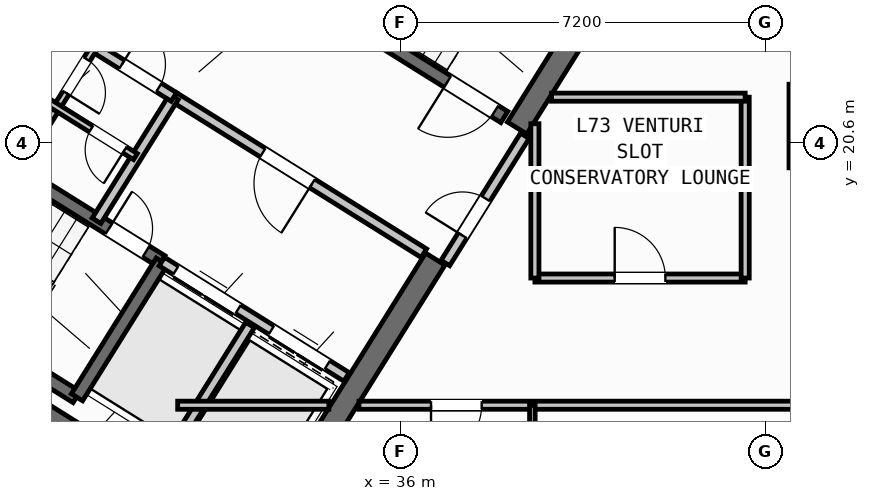
"""IFC4 building model, lengths in metres.
Left out: names, types, materials, properties, quantities, classifications, styles, units other than length and angle.
Written with IfcOpenShell. Run it as: python <this file> out.ifc"""

import sys

from ifc_helpers import new_model, si_unit, direction, frame, frame_2d, origin, place, context, subcontext, project, spatial, rectangle, extrude, source, transform, mapped, element, fill, save


model = new_model("IFC4")
c1 = context("Model", 3, precision=1e-05, world=origin(), true_north=direction((0.0, 1.0)))
c2 = subcontext(c1, "Body", "Model", "MODEL_VIEW")
j1 = project(units=[si_unit("LENGTHUNIT", "METRE"), si_unit("PLANEANGLEUNIT", "RADIAN")], contexts=[c1])
p1 = place(None, origin())
s1 = spatial("IfcSite", under=j1, at=p1, CompositionType="ELEMENT")
p2 = place(p1, origin())
s2 = spatial("IfcBuilding", under=s1, at=p2, CompositionType="ELEMENT")
p3 = place(p2, frame((0.0, 0.0, 288.0)))
s3 = spatial("IfcBuildingStorey", under=s2, at=p3, CompositionType="ELEMENT", Elevation=288.0)
p4 = place(p3, frame((33.324, 12.503, 0.0), z_axis=(0.0, 0.0, 1.0), x_axis=(-0.848043529849, 0.529926571782, 0.0)))
e1 = element("IfcWall", 1, at=p4, inside=s3, PredefinedType="SHEAR", context=c2, shape_type="SweptSolid", body=[
    extrude(rectangle(XDim=13.04, YDim=0.45, at=frame_2d((6.52, 0.0))), origin(), (0.0, 0.0, 1.0), 3.35),
])
p5 = place(p3, frame((40.221, 23.965, 0.0), z_axis=(0.0, 0.0, 1.0), x_axis=(-0.529902075036, -0.848058836916, 0.0)))
e2 = element("IfcWall", 2, at=p5, inside=s3, PredefinedType="SHEAR", context=c2, shape_type="SweptSolid", body=[
    extrude(rectangle(XDim=3.625, YDim=0.45, at=frame_2d((1.812, 0.0))), origin(), (0.0, 0.0, 1.0), 3.35),
])
p6 = place(p3, frame((36.683, 18.304, 0.0), z_axis=(0.0, 0.0, 1.0), x_axis=(-0.529904039071, -0.848057609704, 0.0)))
e3 = element("IfcWall", 3, at=p6, inside=s3, PredefinedType="SHEAR", context=c2, shape_type="SweptSolid", body=[
    extrude(rectangle(XDim=6.475, YDim=0.45, at=frame_2d((3.238, 0.0))), origin(), (0.0, 0.0, 1.0), 3.35),
])
p7 = place(p3, frame((29.268, 6.429, 0.0), z_axis=(0.0, 0.0, 1.0), x_axis=(-0.848048398186, 0.529918780885, 0.0)))
e4 = element("IfcWall", 4, at=p7, inside=s3, PredefinedType="STANDARD", context=c2, shape_type="SweptSolid", body=[
    extrude(rectangle(XDim=25.188, YDim=0.32, at=frame_2d((12.594, 0.0))), origin(), (0.0, 0.0, 1.0), 3.35),
])
p8 = place(p7, frame((16.362, 0.0, 0.0)))
e5 = element("IfcOpeningElement", 5, at=p8, cuts=e4, PredefinedType="OPENING", context=c2, shape_type="SweptSolid", body=[
    extrude(rectangle(XDim=1.2, YDim=2.15, at=frame_2d((0.6, 1.075))), frame((0.0, 0.17, 0.0), z_axis=(0.0, -1.0, 0.0), x_axis=(1.0, 0.0, 0.0)), (0.0, 0.0, 1.0), 0.34),
])
p9 = place(p7, frame((3.859, 0.0, 0.9)))
e6 = element("IfcOpeningElement", 6, at=p9, cuts=e4, PredefinedType="OPENING", context=c2, shape_type="SweptSolid", body=[
    extrude(rectangle(XDim=1.65, YDim=1.45, at=frame_2d((0.825, 0.725))), frame((0.0, 0.17, 0.0), z_axis=(0.0, -1.0, 0.0), x_axis=(1.0, 0.0, 0.0)), (0.0, 0.0, 1.0), 0.34),
])
p10 = place(p7, frame((10.519, 0.0, 0.9)))
e7 = element("IfcOpeningElement", 7, at=p10, cuts=e4, PredefinedType="OPENING", context=c2, shape_type="SweptSolid", body=[
    extrude(rectangle(XDim=1.65, YDim=1.45, at=frame_2d((0.825, 0.725))), frame((0.0, 0.17, 0.0), z_axis=(0.0, -1.0, 0.0), x_axis=(1.0, 0.0, 0.0)), (0.0, 0.0, 1.0), 0.34),
])
p11 = place(p7, frame((19.841, 0.0, 0.95)))
e8 = element("IfcOpeningElement", 8, at=p11, cuts=e4, PredefinedType="OPENING", context=c2, shape_type="SweptSolid", body=[
    extrude(rectangle(XDim=1.95, YDim=1.35, at=frame_2d((0.975, 0.675))), frame((0.0, 0.17, 0.0), z_axis=(0.0, -1.0, 0.0), x_axis=(1.0, 0.0, 0.0)), (0.0, 0.0, 1.0), 0.34),
])
p12 = place(p7, frame((23.478, 0.0, 1.0)))
e9 = element("IfcOpeningElement", 9, at=p12, cuts=e4, PredefinedType="OPENING", context=c2, shape_type="SweptSolid", body=[
    extrude(rectangle(XDim=0.9, YDim=1.25, at=frame_2d((0.45, 0.625))), frame((0.0, 0.17, 0.0), z_axis=(0.0, -1.0, 0.0), x_axis=(1.0, 0.0, 0.0)), (0.0, 0.0, 1.0), 0.34),
])
p13 = place(p3, frame((29.605, 15.581, 0.0), z_axis=(0.0, 0.0, 1.0), x_axis=(-0.848036911448, 0.529937163087, 0.0)))
e10 = element("IfcWall", 10, at=p13, inside=s3, PredefinedType="SHEAR", context=c2, shape_type="SweptSolid", body=[
    extrude(rectangle(XDim=7.46, YDim=0.26, at=frame_2d((3.73, 0.0))), origin(), (0.0, 0.0, 1.0), 3.35),
])
p14 = place(p3, frame((31.28, 18.261, 0.0), z_axis=(0.0, 0.0, 1.0), x_axis=(-0.848051618787, 0.529913626805, 0.0)))
e11 = element("IfcWall", 11, at=p14, inside=s3, PredefinedType="SHEAR", context=c2, shape_type="SweptSolid", body=[
    extrude(rectangle(XDim=7.46, YDim=0.26, at=frame_2d((3.73, 0.0))), origin(), (0.0, 0.0, 1.0), 3.35),
])
p15 = place(p14, frame((0.36, 0.0, 0.0)))
e12 = element("IfcOpeningElement", 12, at=p15, cuts=e11, PredefinedType="OPENING", context=c2, shape_type="SweptSolid", body=[
    extrude(rectangle(XDim=0.86, YDim=2.05, at=frame_2d((0.43, 1.025))), frame((0.0, 0.14, 0.0), z_axis=(0.0, -1.0, 0.0), x_axis=(1.0, 0.0, 0.0)), (0.0, 0.0, 1.0), 0.28),
])
p16 = place(p3, frame((31.288, 18.256, 0.0), z_axis=(0.0, 0.0, 1.0), x_axis=(-0.529943379326, -0.848033026897, 0.0)))
e13 = element("IfcWall", 13, at=p16, inside=s3, PredefinedType="SHEAR", context=c2, shape_type="SweptSolid", body=[
    extrude(rectangle(XDim=3.16, YDim=0.26, at=frame_2d((1.58, 0.0))), origin(), (0.0, 0.0, 1.0), 3.35),
])
p17 = place(p3, frame((38.046, 21.108, 0.0), z_axis=(0.0, 0.0, 1.0), x_axis=(-0.848054434086, 0.529909121291, 0.0)))
e14 = element("IfcWall", 14, at=p17, inside=s3, PredefinedType="SHEAR", context=c2, shape_type="SweptSolid", body=[
    extrude(rectangle(XDim=7.33, YDim=0.26, at=frame_2d((3.665, 0.0))), origin(), (0.0, 0.0, 1.0), 3.35),
])
p18 = place(p17, frame((0.22, 0.0, 0.0)))
e15 = element("IfcOpeningElement", 15, at=p18, cuts=e14, PredefinedType="OPENING", context=c2, shape_type="SweptSolid", body=[
    extrude(rectangle(XDim=1.1, YDim=2.1, at=frame_2d((0.55, 1.05))), frame((0.0, 0.14, 0.0), z_axis=(0.0, -1.0, 0.0), x_axis=(1.0, 0.0, 0.0)), (0.0, 0.0, 1.0), 0.28),
])
p19 = place(p3, frame((34.933, 15.978, 0.0), z_axis=(0.0, 0.0, 1.0), x_axis=(-0.848055739377, 0.529907032327, 0.0)))
e16 = element("IfcWall", 16, at=p19, inside=s3, PredefinedType="STANDARD", context=c2, shape_type="SweptSolid", body=[
    extrude(rectangle(XDim=4.298, YDim=0.2, at=frame_2d((2.149, 0.0))), origin(), (0.0, 0.0, 1.0), 3.34),
])
p20 = place(p19, frame((0.448, 0.0, 0.0)))
e17 = element("IfcOpeningElement", 17, at=p20, cuts=e16, PredefinedType="OPENING", context=c2, shape_type="SweptSolid", body=[
    extrude(rectangle(XDim=1.3, YDim=2.2, at=frame_2d((0.65, 1.1))), frame((0.0, 0.11, 0.0), z_axis=(0.0, -1.0, 0.0), x_axis=(1.0, 0.0, 0.0)), (0.0, 0.0, 1.0), 0.22),
])
p21 = place(p19, frame((2.523, 0.0, 0.0)))
e18 = element("IfcOpeningElement", 18, at=p21, cuts=e16, PredefinedType="OPENING", context=c2, shape_type="SweptSolid", body=[
    extrude(rectangle(XDim=1.45, YDim=2.25, at=frame_2d((0.725, 1.125))), frame((0.0, 0.11, 0.0), z_axis=(0.0, -1.0, 0.0), x_axis=(1.0, 0.0, 0.0)), (0.0, 0.0, 1.0), 0.22),
])
p22 = place(p3, frame((36.459, 18.421, 0.0), z_axis=(0.0, 0.0, 1.0), x_axis=(-0.848059591691, 0.529900867089, 0.0)))
e19 = element("IfcWall", 19, at=p22, inside=s3, PredefinedType="STANDARD", context=c2, shape_type="SweptSolid", body=[
    extrude(rectangle(XDim=5.818, YDim=0.2, at=frame_2d((2.909, 0.0))), origin(), (0.0, 0.0, 1.0), 3.34),
])
p23 = place(p22, frame((2.598, 0.0, 0.0)))
e20 = element("IfcOpeningElement", 20, at=p23, cuts=e19, PredefinedType="OPENING", context=c2, shape_type="SweptSolid", body=[
    extrude(rectangle(XDim=1.15, YDim=2.1, at=frame_2d((0.575, 1.05))), frame((0.0, 0.11, 0.0), z_axis=(0.0, -1.0, 0.0), x_axis=(1.0, 0.0, 0.0)), (0.0, 0.0, 1.0), 0.22),
])
p24 = place(p3, frame((33.029, 17.003, 0.0), z_axis=(0.0, 0.0, 1.0), x_axis=(-0.529916267533, -0.848049968695, 0.0)))
e21 = element("IfcWall", 21, at=p24, inside=s3, PredefinedType="STANDARD", context=c2, shape_type="SweptSolid", body=[
    extrude(rectangle(XDim=2.92, YDim=0.2, at=frame_2d((1.46, 0.0))), origin(), (0.0, 0.0, 1.0), 3.34),
])
p25 = place(p3, frame((31.525, 21.504, 0.0), z_axis=(0.0, 0.0, 1.0), x_axis=(-0.529907497854, -0.848055448493, 0.0)))
e22 = element("IfcWall", 22, at=p25, inside=s3, PredefinedType="STANDARD", context=c2, shape_type="SweptSolid", body=[
    extrude(rectangle(XDim=2.88, YDim=0.2, at=frame_2d((1.44, 0.0))), origin(), (0.0, 0.0, 1.0), 3.34),
])
p26 = place(p3, frame((31.525, 21.504, 0.0), z_axis=(0.0, 0.0, 1.0), x_axis=(-0.848042066329, 0.529928913853, 0.0)))
e23 = element("IfcWall", 23, at=p26, inside=s3, PredefinedType="STANDARD", context=c2, shape_type="SweptSolid", body=[
    extrude(rectangle(XDim=6.268, YDim=0.2, at=frame_2d((3.134, 0.0))), origin(), (0.0, 0.0, 1.0), 3.34),
])
p27 = place(p26, frame((4.4, 0.0, 0.0)))
e24 = element("IfcOpeningElement", 24, at=p27, cuts=e23, PredefinedType="OPENING", context=c2, shape_type="SweptSolid", body=[
    extrude(rectangle(XDim=0.86, YDim=2.05, at=frame_2d((0.43, 1.025))), frame((0.0, 0.11, 0.0), z_axis=(0.0, -1.0, 0.0), x_axis=(1.0, 0.0, 0.0)), (0.0, 0.0, 1.0), 0.22),
])
p28 = place(p26, frame((0.35, 0.0, 0.0)))
e25 = element("IfcOpeningElement", 25, at=p28, cuts=e23, PredefinedType="OPENING", context=c2, shape_type="SweptSolid", body=[
    extrude(rectangle(XDim=0.86, YDim=2.05, at=frame_2d((0.43, 1.025))), frame((0.0, 0.11, 0.0), z_axis=(0.0, -1.0, 0.0), x_axis=(1.0, 0.0, 0.0)), (0.0, 0.0, 1.0), 0.22),
])
p29 = place(p3, frame((29.956, 22.484, 0.0), z_axis=(0.0, 0.0, 1.0), x_axis=(-0.529951914384, -0.848027693204, 0.0)))
e26 = element("IfcWall", 26, at=p29, inside=s3, PredefinedType="PLUMBINGWALL", context=c2, shape_type="SweptSolid", body=[
    extrude(rectangle(XDim=1.4, YDim=0.14, at=frame_2d((0.7, 0.0))), origin(), (0.0, 0.0, 1.0), 3.34),
])
p30 = place(p29, frame((0.28, 0.0, 0.0)))
e27 = element("IfcOpeningElement", 27, at=p30, cuts=e26, PredefinedType="OPENING", context=c2, shape_type="SweptSolid", body=[
    extrude(rectangle(XDim=0.78, YDim=2.05, at=frame_2d((0.39, 1.025))), frame((0.0, 0.08, 0.0), z_axis=(0.0, -1.0, 0.0), x_axis=(1.0, 0.0, 0.0)), (0.0, 0.0, 1.0), 0.16),
])
p31 = place(p3, frame((29.214, 21.297, 0.0), z_axis=(0.0, 0.0, 1.0), x_axis=(-0.529865479138, -0.848081702443, 0.0)))
e28 = element("IfcWall", 28, at=p31, inside=s3, PredefinedType="PLUMBINGWALL", context=c2, shape_type="SweptSolid", body=[
    extrude(rectangle(XDim=1.48, YDim=0.14, at=frame_2d((0.74, 0.0))), origin(), (0.0, 0.0, 1.0), 3.34),
])
p32 = place(p3, frame((30.766, 20.327, 0.0), z_axis=(0.0, 0.0, 1.0), x_axis=(-0.848052663127, 0.529911955482, 0.0)))
e29 = element("IfcWall", 29, at=p32, inside=s3, PredefinedType="PLUMBINGWALL", context=c2, shape_type="SweptSolid", body=[
    extrude(rectangle(XDim=3.28, YDim=0.14, at=frame_2d((1.64, 0.0))), origin(), (0.0, 0.0, 1.0), 3.34),
])
p33 = place(p32, frame((0.25, 0.0, 0.0)))
e30 = element("IfcOpeningElement", 30, at=p33, cuts=e29, PredefinedType="OPENING", context=c2, shape_type="SweptSolid", body=[
    extrude(rectangle(XDim=0.78, YDim=2.05, at=frame_2d((0.39, 1.025))), frame((0.0, 0.08, 0.0), z_axis=(0.0, -1.0, 0.0), x_axis=(1.0, 0.0, 0.0)), (0.0, 0.0, 1.0), 0.16),
])
p34 = place(p32, frame((2.11, 0.0, 0.0)))
e31 = element("IfcOpeningElement", 31, at=p34, cuts=e29, PredefinedType="OPENING", context=c2, shape_type="SweptSolid", body=[
    extrude(rectangle(XDim=0.78, YDim=2.05, at=frame_2d((0.39, 1.025))), frame((0.0, 0.08, 0.0), z_axis=(0.0, -1.0, 0.0), x_axis=(1.0, 0.0, 0.0)), (0.0, 0.0, 1.0), 0.16),
])
p35 = place(p3, frame((32.164, 10.374, 0.0), z_axis=(0.0, 0.0, 1.0), x_axis=(-0.848044107957, 0.529925646633, 0.0)))
e32 = element("IfcWall", 32, at=p35, inside=s3, PredefinedType="PARTITIONING", context=c2, shape_type="SweptSolid", body=[
    extrude(rectangle(XDim=15.57, YDim=0.16, at=frame_2d((7.785, 0.0))), origin(), (0.0, 0.0, 1.0), 3.34),
])
p36 = place(p35, frame((10.83, 0.0, 0.0)))
e33 = element("IfcOpeningElement", 33, at=p36, cuts=e32, PredefinedType="OPENING", context=c2, shape_type="SweptSolid", body=[
    extrude(rectangle(XDim=1.0, YDim=2.1, at=frame_2d((0.5, 1.05))), frame((0.0, 0.09, 0.0), z_axis=(0.0, -1.0, 0.0), x_axis=(1.0, 0.0, 0.0)), (0.0, 0.0, 1.0), 0.18),
])
p37 = place(p3, frame((29.72, 8.859, 0.0), z_axis=(0.0, 0.0, 1.0), x_axis=(-0.848049134363, 0.529917602752, 0.0)))
e34 = element("IfcWall", 34, at=p37, inside=s3, PredefinedType="PLUMBINGWALL", context=c2, shape_type="SweptSolid", body=[
    extrude(rectangle(XDim=14.3, YDim=0.14, at=frame_2d((7.15, 0.0))), origin(), (0.0, 0.0, 1.0), 3.34),
])
p38 = place(p37, frame((9.57, 0.0, 0.0)))
e35 = element("IfcOpeningElement", 35, at=p38, cuts=e34, PredefinedType="OPENING", context=c2, shape_type="SweptSolid", body=[
    extrude(rectangle(XDim=0.92, YDim=2.08, at=frame_2d((0.46, 1.04))), frame((0.0, 0.08, 0.0), z_axis=(0.0, -1.0, 0.0), x_axis=(1.0, 0.0, 0.0)), (0.0, 0.0, 1.0), 0.16),
])
p39 = place(p3, frame((38.451, 20.737, 0.0), z_axis=(0.0, 0.0, 1.0), x_axis=(-0.529924799939, -0.848044637038, 0.0)))
e36 = element("IfcWall", 36, at=p39, inside=s3, PredefinedType="STANDARD", context=c2, shape_type="SweptSolid", body=[
    extrude(rectangle(XDim=2.96, YDim=0.2, at=frame_2d((1.48, 0.0))), origin(), (0.0, 0.0, 1.0), 3.34),
])
p40 = place(p39, frame((1.46, 0.0, 0.0)))
e37 = element("IfcOpeningElement", 37, at=p40, cuts=e36, PredefinedType="OPENING", context=c2, shape_type="SweptSolid", body=[
    extrude(rectangle(XDim=0.86, YDim=2.05, at=frame_2d((0.43, 1.025))), frame((0.0, 0.11, 0.0), z_axis=(0.0, -1.0, 0.0), x_axis=(1.0, 0.0, 0.0)), (0.0, 0.0, 1.0), 0.22),
])
p41 = place(p3, frame((31.6, 15.42, 0.0), z_axis=(0.0, 0.0, 1.0), x_axis=(1.0, 0.0, 0.0)))
e38 = element("IfcWall", 38, at=p41, inside=s3, PredefinedType="PARTITIONING", context=c2, shape_type="SweptSolid", body=[
    extrude(rectangle(XDim=2.984, YDim=0.16, at=frame_2d((1.492, 0.0))), origin(), (0.0, 0.0, 1.0), 3.34),
])
p42 = place(p3, frame((35.178, 15.42, 0.0), z_axis=(0.0, 0.0, 1.0), x_axis=(1.0, 0.0, 0.0)))
e39 = element("IfcWall", 39, at=p42, inside=s3, PredefinedType="PARTITIONING", context=c2, shape_type="SweptSolid", body=[
    extrude(rectangle(XDim=9.021, YDim=0.16, at=frame_2d((4.511, 0.0))), origin(), (0.0, 0.0, 1.0), 3.34),
])
p43 = place(p42, frame((1.422, 0.0, 0.0)))
e40 = element("IfcOpeningElement", 40, at=p43, cuts=e39, PredefinedType="OPENING", context=c2, shape_type="SweptSolid", body=[
    extrude(rectangle(XDim=1.0, YDim=2.1, at=frame_2d((0.5, 1.05))), frame((0.0, 0.09, 0.0), z_axis=(0.0, -1.0, 0.0), x_axis=(1.0, 0.0, 0.0)), (0.0, 0.0, 1.0), 0.18),
])
p44 = place(p3, frame((38.65, 17.93, 0.0), z_axis=(0.0, 0.0, 1.0), x_axis=(1.0, 0.0, 0.0)))
e41 = element("IfcWall", 41, at=p44, inside=s3, PredefinedType="PARTITIONING", context=c2, shape_type="SweptSolid", body=[
    extrude(rectangle(XDim=4.15, YDim=0.16, at=frame_2d((2.075, 0.0))), origin(), (0.0, 0.0, 1.0), 3.34),
])
p45 = place(p44, frame((1.575, 0.0, 0.0)))
e42 = element("IfcOpeningElement", 42, at=p45, cuts=e41, PredefinedType="OPENING", context=c2, shape_type="SweptSolid", body=[
    extrude(rectangle(XDim=1.0, YDim=2.1, at=frame_2d((0.5, 1.05))), frame((0.0, 0.09, 0.0), z_axis=(0.0, -1.0, 0.0), x_axis=(1.0, 0.0, 0.0)), (0.0, 0.0, 1.0), 0.18),
])
p46 = place(p3, frame((38.65, 17.93, 0.0), z_axis=(0.0, 0.0, 1.0), x_axis=(0.0, 1.0, 0.0)))
e43 = element("IfcWall", 43, at=p46, inside=s3, PredefinedType="PARTITIONING", context=c2, shape_type="SweptSolid", body=[
    extrude(rectangle(XDim=3.046, YDim=0.16, at=frame_2d((1.523, 0.0))), origin(), (0.0, 0.0, 1.0), 3.34),
])
p47 = place(p3, frame((42.8, 17.93, 0.0), z_axis=(0.0, 0.0, 1.0), x_axis=(0.0, 1.0, 0.0)))
e44 = element("IfcWall", 44, at=p47, inside=s3, PredefinedType="PARTITIONING", context=c2, shape_type="SweptSolid", body=[
    extrude(rectangle(XDim=3.57, YDim=0.16, at=frame_2d((1.785, 0.0))), origin(), (0.0, 0.0, 1.0), 3.34),
])
p48 = place(p3, frame((38.978, 21.5, 0.0), z_axis=(0.0, 0.0, 1.0), x_axis=(1.0, 0.0, 0.0)))
e45 = element("IfcWall", 45, at=p48, inside=s3, PredefinedType="PARTITIONING", context=c2, shape_type="SweptSolid", body=[
    extrude(rectangle(XDim=3.823, YDim=0.16, at=frame_2d((1.911, 0.0))), origin(), (0.0, 0.0, 1.0), 3.34),
])
p49 = place(p3, frame((38.6, 1.96, 0.0), z_axis=(0.0, 0.0, 1.0), x_axis=(0.0, 1.0, 0.0)))
e46 = element("IfcWall", 46, at=p49, inside=s3, PredefinedType="PARTITIONING", context=c2, shape_type="SweptSolid", body=[
    extrude(rectangle(XDim=13.46, YDim=0.11, at=frame_2d((6.73, 0.0))), origin(), (0.0, 0.0, 1.0), 3.34),
])
p50 = place(p49, frame((5.2, 0.0, 0.0)))
e47 = element("IfcOpeningElement", 47, at=p50, cuts=e46, PredefinedType="OPENING", context=c2, shape_type="SweptSolid", body=[
    extrude(rectangle(XDim=0.92, YDim=2.08, at=frame_2d((0.46, 1.04))), frame((0.0, 0.065, 0.0), z_axis=(0.0, -1.0, 0.0), x_axis=(1.0, 0.0, 0.0)), (0.0, 0.0, 1.0), 0.13),
])
p51 = place(p49, frame((10.45, 0.0, 0.0)))
e48 = element("IfcOpeningElement", 48, at=p51, cuts=e46, PredefinedType="OPENING", context=c2, shape_type="SweptSolid", body=[
    extrude(rectangle(XDim=0.88, YDim=2.08, at=frame_2d((0.44, 1.04))), frame((0.0, 0.065, 0.0), z_axis=(0.0, -1.0, 0.0), x_axis=(1.0, 0.0, 0.0)), (0.0, 0.0, 1.0), 0.13),
])
m1 = source(origin(), c2, "Body", "SweptSolid", [
    extrude(rectangle(XDim=0.86, YDim=2.05, at=frame_2d((0.43, 1.025))), frame((0.0, 0.025, 0.0), z_axis=(0.0, -1.0, 0.0), x_axis=(1.0, 0.0, 0.0)), (0.0, 0.0, 1.0), 0.05),
])
p52 = place(p15, frame((0.86, 0.0, 0.0), z_axis=(0.0, 0.0, 1.0), x_axis=(-1.0, 0.0, 0.0)))
e49 = element("IfcDoor", 49, at=p52, inside=s3, OperationType="SINGLE_SWING_LEFT", PredefinedType="DOOR", context=c2, shape_type="MappedRepresentation", body=[
    mapped(m1, transform((0.0, 0.0, 0.0), scale=1.0)),
])
fill(e12, e49)
m2 = source(origin(), c2, "Body", "SweptSolid", [
    extrude(rectangle(XDim=1.1, YDim=2.1, at=frame_2d((0.55, 1.05))), frame((0.0, 0.025, 0.0), z_axis=(0.0, -1.0, 0.0), x_axis=(1.0, 0.0, 0.0)), (0.0, 0.0, 1.0), 0.05),
])
p53 = place(p18, origin())
e50 = element("IfcDoor", 50, at=p53, inside=s3, OperationType="SINGLE_SWING_RIGHT", PredefinedType="DOOR", context=c2, shape_type="MappedRepresentation", body=[
    mapped(m2, transform((0.0, 0.0, 0.0), scale=1.0)),
])
fill(e15, e50)
m3 = source(origin(), c2, "Body", "SweptSolid", [
    extrude(rectangle(XDim=1.15, YDim=2.1, at=frame_2d((0.575, 1.05))), frame((0.0, 0.025, 0.0), z_axis=(0.0, -1.0, 0.0), x_axis=(1.0, 0.0, 0.0)), (0.0, 0.0, 1.0), 0.05),
])
p54 = place(p23, origin())
e51 = element("IfcDoor", 51, at=p54, inside=s3, OperationType="SINGLE_SWING_LEFT", PredefinedType="DOOR", context=c2, shape_type="MappedRepresentation", body=[
    mapped(m3, transform((0.0, 0.0, 0.0), scale=1.0)),
])
fill(e20, e51)
m4 = source(origin(), c2, "Body", "SweptSolid", [
    extrude(rectangle(XDim=1.3, YDim=2.2, at=frame_2d((0.65, 1.1))), frame((0.0, 0.025, 0.0), z_axis=(0.0, -1.0, 0.0), x_axis=(1.0, 0.0, 0.0)), (0.0, 0.0, 1.0), 0.05),
])
p55 = place(p20, origin())
e52 = element("IfcDoor", 52, at=p55, inside=s3, OperationType="DOUBLE_DOOR_SLIDING", PredefinedType="DOOR", context=c2, shape_type="MappedRepresentation", body=[
    mapped(m4, transform((0.0, 0.0, 0.0), scale=1.0)),
])
fill(e17, e52)
m5 = source(origin(), c2, "Body", "SweptSolid", [
    extrude(rectangle(XDim=1.45, YDim=2.25, at=frame_2d((0.725, 1.125))), frame((0.0, 0.025, 0.0), z_axis=(0.0, -1.0, 0.0), x_axis=(1.0, 0.0, 0.0)), (0.0, 0.0, 1.0), 0.05),
])
p56 = place(p21, origin())
e53 = element("IfcDoor", 53, at=p56, inside=s3, OperationType="DOUBLE_DOOR_SLIDING", PredefinedType="DOOR", context=c2, shape_type="MappedRepresentation", body=[
    mapped(m5, transform((0.0, 0.0, 0.0), scale=1.0)),
])
fill(e18, e53)
p57 = place(p28, frame((0.86, 0.0, 0.0), z_axis=(0.0, 0.0, 1.0), x_axis=(-1.0, 0.0, 0.0)))
e54 = element("IfcDoor", 54, at=p57, inside=s3, OperationType="SINGLE_SWING_LEFT", PredefinedType="DOOR", context=c2, shape_type="MappedRepresentation", body=[
    mapped(m1, transform((0.0, 0.0, 0.0), scale=1.0)),
])
fill(e25, e54)
m6 = source(origin(), c2, "Body", "SweptSolid", [
    extrude(rectangle(XDim=0.78, YDim=2.05, at=frame_2d((0.39, 1.025))), frame((0.0, 0.025, 0.0), z_axis=(0.0, -1.0, 0.0), x_axis=(1.0, 0.0, 0.0)), (0.0, 0.0, 1.0), 0.05),
])
p58 = place(p30, origin())
e55 = element("IfcDoor", 55, at=p58, inside=s3, OperationType="SINGLE_SWING_RIGHT", PredefinedType="DOOR", context=c2, shape_type="MappedRepresentation", body=[
    mapped(m6, transform((0.0, 0.0, 0.0), scale=1.0)),
])
fill(e27, e55)
p59 = place(p33, origin())
e56 = element("IfcDoor", 56, at=p59, inside=s3, OperationType="SINGLE_SWING_LEFT", PredefinedType="DOOR", context=c2, shape_type="MappedRepresentation", body=[
    mapped(m6, transform((0.0, 0.0, 0.0), scale=1.0)),
])
fill(e30, e56)
m7 = source(origin(), c2, "Body", "SweptSolid", [
    extrude(rectangle(XDim=1.0, YDim=2.1, at=frame_2d((0.5, 1.05))), frame((0.0, 0.025, 0.0), z_axis=(0.0, -1.0, 0.0), x_axis=(1.0, 0.0, 0.0)), (0.0, 0.0, 1.0), 0.05),
])
p60 = place(p45, origin())
e57 = element("IfcDoor", 57, at=p60, inside=s3, OperationType="SINGLE_SWING_LEFT", PredefinedType="DOOR", context=c2, shape_type="MappedRepresentation", body=[
    mapped(m7, transform((0.0, 0.0, 0.0), scale=1.0)),
])
fill(e42, e57)
p61 = place(p40, frame((0.86, 0.0, 0.0), z_axis=(0.0, 0.0, 1.0), x_axis=(-1.0, 0.0, 0.0)))
e58 = element("IfcDoor", 58, at=p61, inside=s3, OperationType="SINGLE_SWING_LEFT", PredefinedType="DOOR", context=c2, shape_type="MappedRepresentation", body=[
    mapped(m1, transform((0.0, 0.0, 0.0), scale=1.0)),
])
fill(e37, e58)
p62 = place(p43, frame((1.0, 0.0, 0.0), z_axis=(0.0, 0.0, 1.0), x_axis=(-1.0, 0.0, 0.0)))
e59 = element("IfcDoor", 59, at=p62, inside=s3, OperationType="SINGLE_SWING_RIGHT", PredefinedType="DOOR", context=c2, shape_type="MappedRepresentation", body=[
    mapped(m7, transform((0.0, 0.0, 0.0), scale=1.0)),
])
fill(e40, e59)
save(model, sys.argv[1])
